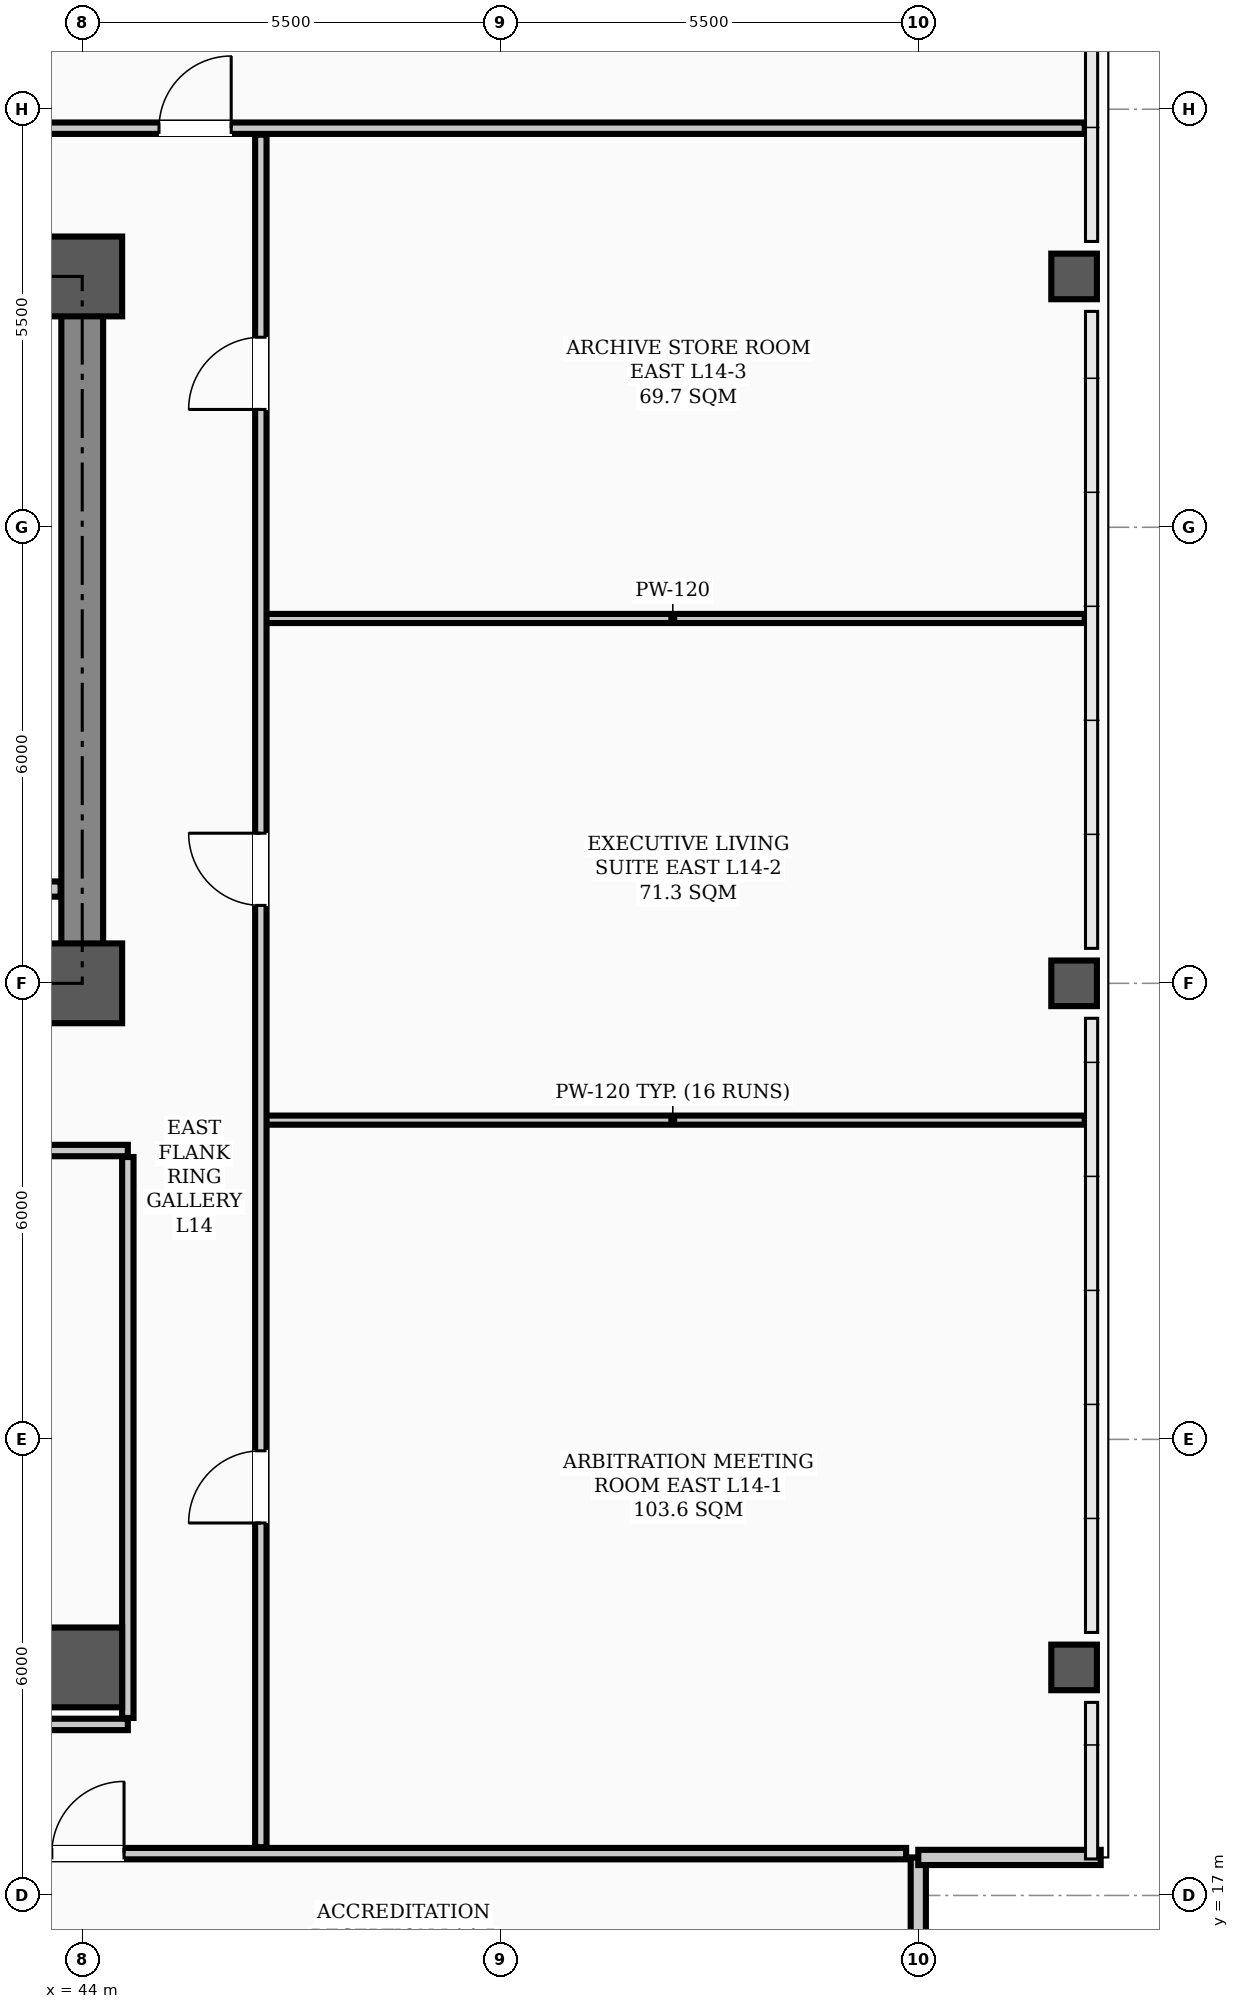
"""IFC4 building model, lengths in metres.
Left out: names, types, materials, properties, quantities, classifications, styles, units other than length and angle.
Written with IfcOpenShell. Run it as: python <this file> out.ifc"""

import sys

from ifc_helpers import new_model, si_unit, direction, frame, frame_2d, origin, origin_2d, place, context, subcontext, project, spatial, rectangle, hollow_rectangle, extrude, element, fill, save


model = new_model("IFC4")
c1 = context("Model", 3, precision=1e-05, world=origin(), true_north=direction((0.0, 1.0)))
c2 = subcontext(c1, "Body", "Model", "MODEL_VIEW")
j1 = project(units=[si_unit("LENGTHUNIT", "METRE"), si_unit("PLANEANGLEUNIT", "RADIAN")], contexts=[c1])
p1 = place(None, origin())
s1 = spatial("IfcSite", under=j1, at=p1, CompositionType="ELEMENT")
p2 = place(p1, origin())
s2 = spatial("IfcBuilding", under=s1, at=p2, CompositionType="ELEMENT")
p3 = place(p2, frame((0.0, 0.0, 57.7)))
s3 = spatial("IfcBuildingStorey", under=s2, at=p3, CompositionType="ELEMENT", Elevation=57.7)
for number, where, z_axis, x_axis in (
    (1, (44.0, 29.0, 0.0), (0.0, 0.0, 1.0), (1.0, 0.0, 0.0)),
    (2, (44.0, 38.3, 0.0), (0.0, 0.0, 1.0), (1.0, 0.0, 0.0)),
    (3, (44.0, 20.0, 0.0), (0.0, 0.0, 1.0), (1.0, 0.0, 0.0)),
):
    element("IfcColumn", number, at=place(p3, frame(where, z_axis=z_axis, x_axis=x_axis)), inside=s3, PredefinedType="COLUMN", context=c2, shape_type="SweptSolid", body=[
        extrude(hollow_rectangle(XDim=1.05, YDim=1.05, WallThickness=0.038, InnerFilletRadius=0.019, OuterFilletRadius=0.057, at=origin_2d()), origin(), (0.0, 0.0, 1.0), 3.9),
    ])
for number, where, z_axis, x_axis in (
    (4, (57.05, 20.0, 0.0), (0.0, 0.0, 1.0), (1.0, 0.0, 0.0)),
    (5, (57.05, 29.0, 0.0), (0.0, 0.0, 1.0), (1.0, 0.0, 0.0)),
    (6, (57.05, 38.3, 0.0), (0.0, 0.0, 1.0), (1.0, 0.0, 0.0)),
):
    element("IfcColumn", number, at=place(p3, frame(where, z_axis=z_axis, x_axis=x_axis)), inside=s3, PredefinedType="COLUMN", context=c2, shape_type="SweptSolid", body=[
        extrude(hollow_rectangle(XDim=0.6, YDim=0.6, WallThickness=0.026, InnerFilletRadius=0.013, OuterFilletRadius=0.039, at=origin_2d()), origin(), (0.0, 0.0, 1.0), 3.9),
    ])
for number, where, z_axis, x_axis in (
    (7, (55.0, 15.1, 0.0), (0.0, 0.0, 1.0), (0.0, 1.0, 0.0)),
    (8, (55.0, 17.5, 0.0), (0.0, 0.0, 1.0), (1.0, 0.0, 0.0)),
):
    element("IfcWall", number, at=place(p3, frame(where, z_axis=z_axis, x_axis=x_axis)), inside=s3, PredefinedType="PARAPET", context=c2, shape_type="SweptSolid", body=[
        extrude(rectangle(XDim=2.4, YDim=0.2, at=frame_2d((1.2, 0.0))), origin(), (0.0, 0.0, 1.0), 1.2),
    ])
p4 = place(p3, frame((13.5, 29.0, 0.0), z_axis=(0.0, 0.0, 1.0), x_axis=(1.0, 0.0, 0.0)))
e9 = element("IfcWall", 9, at=p4, inside=s3, PredefinedType="SHEAR", context=c2, shape_type="SweptSolid", body=[
    extrude(rectangle(XDim=30.5, YDim=0.55, at=frame_2d((15.25, 0.0))), origin(), (0.0, 0.0, 1.0), 3.72),
])
p5 = place(p4, frame((1.75, 0.0, 0.0)))
e10 = element("IfcOpeningElement", 10, at=p5, cuts=e9, PredefinedType="OPENING", context=c2, shape_type="SweptSolid", body=[
    extrude(rectangle(XDim=1.1, YDim=2.08, at=frame_2d((0.55, 1.04))), frame((0.0, 0.285, 0.0), z_axis=(0.0, -1.0, 0.0), x_axis=(1.0, 0.0, 0.0)), (0.0, 0.0, 1.0), 0.57),
])
p6 = place(p4, frame((26.7, 0.0, 0.0)))
e11 = element("IfcOpeningElement", 11, at=p6, cuts=e9, PredefinedType="OPENING", context=c2, shape_type="SweptSolid", body=[
    extrude(rectangle(XDim=1.1, YDim=2.08, at=frame_2d((0.55, 1.04))), frame((0.0, 0.285, 0.0), z_axis=(0.0, -1.0, 0.0), x_axis=(1.0, 0.0, 0.0)), (0.0, 0.0, 1.0), 0.57),
])
p7 = place(p4, frame((6.8, 0.0, 0.0)))
e12 = element("IfcOpeningElement", 12, at=p7, cuts=e9, PredefinedType="OPENING", context=c2, shape_type="SweptSolid", body=[
    extrude(rectangle(XDim=1.1, YDim=2.08, at=frame_2d((0.55, 1.04))), frame((0.0, 0.285, 0.0), z_axis=(0.0, -1.0, 0.0), x_axis=(1.0, 0.0, 0.0)), (0.0, 0.0, 1.0), 0.57),
])
p8 = place(p4, frame((13.2, 0.0, 0.0)))
e13 = element("IfcOpeningElement", 13, at=p8, cuts=e9, PredefinedType="OPENING", context=c2, shape_type="SweptSolid", body=[
    extrude(rectangle(XDim=1.6, YDim=2.08, at=frame_2d((0.8, 1.04))), frame((0.0, 0.285, 0.0), z_axis=(0.0, -1.0, 0.0), x_axis=(1.0, 0.0, 0.0)), (0.0, 0.0, 1.0), 0.57),
])
p9 = place(p4, frame((20.525, 0.0, 0.0)))
e14 = element("IfcOpeningElement", 14, at=p9, cuts=e9, PredefinedType="OPENING", context=c2, shape_type="SweptSolid", body=[
    extrude(rectangle(XDim=0.95, YDim=2.08, at=frame_2d((0.475, 1.04))), frame((0.0, 0.285, 0.0), z_axis=(0.0, -1.0, 0.0), x_axis=(1.0, 0.0, 0.0)), (0.0, 0.0, 1.0), 0.57),
])
p10 = place(p3, frame((13.5, 38.3, 0.0), z_axis=(0.0, 0.0, 1.0), x_axis=(1.0, 0.0, 0.0)))
e15 = element("IfcWall", 15, at=p10, inside=s3, PredefinedType="SHEAR", context=c2, shape_type="SweptSolid", body=[
    extrude(rectangle(XDim=30.5, YDim=0.55, at=frame_2d((15.25, 0.0))), origin(), (0.0, 0.0, 1.0), 3.72),
])
p11 = place(p3, frame((44.0, 29.35, 0.0), z_axis=(0.0, 0.0, 1.0), x_axis=(0.0, 1.0, 0.0)))
e16 = element("IfcWall", 16, at=p11, inside=s3, PredefinedType="SHEAR", context=c2, shape_type="SweptSolid", body=[
    extrude(rectangle(XDim=8.6, YDim=0.55, at=frame_2d((4.3, 0.0))), origin(), (0.0, 0.0, 1.0), 3.72),
])
p12 = place(p3, frame((42.4, 30.24, 0.0), z_axis=(0.0, 0.0, 1.0), x_axis=(1.0, 0.0, 0.0)))
e17 = element("IfcWall", 17, at=p12, inside=s3, PredefinedType="STANDARD", context=c2, shape_type="SweptSolid", body=[
    extrude(rectangle(XDim=1.315, YDim=0.2, at=frame_2d((0.658, 0.0))), origin(), (0.0, 0.0, 1.0), 3.1),
])
p13 = place(p3, frame((12.9, 26.8, 0.0), z_axis=(0.0, 0.0, 1.0), x_axis=(1.0, 0.0, 0.0)))
e18 = element("IfcWall", 18, at=p13, inside=s3, PredefinedType="PARTITIONING", context=c2, shape_type="SweptSolid", body=[
    extrude(rectangle(XDim=31.7, YDim=0.15, at=frame_2d((15.85, 0.0))), origin(), (0.0, 0.0, 1.0), 3.1),
])
p14 = place(p13, frame((13.6, 0.0, 0.0)))
e19 = element("IfcOpeningElement", 19, at=p14, cuts=e18, PredefinedType="OPENING", context=c2, shape_type="SweptSolid", body=[
    extrude(rectangle(XDim=1.6, YDim=2.08, at=frame_2d((0.8, 1.04))), frame((0.0, 0.085, 0.0), z_axis=(0.0, -1.0, 0.0), x_axis=(1.0, 0.0, 0.0)), (0.0, 0.0, 1.0), 0.17),
])
p15 = place(p13, frame((2.475, 0.0, 0.0)))
e20 = element("IfcOpeningElement", 20, at=p15, cuts=e18, PredefinedType="OPENING", context=c2, shape_type="SweptSolid", body=[
    extrude(rectangle(XDim=0.95, YDim=2.08, at=frame_2d((0.475, 1.04))), frame((0.0, 0.085, 0.0), z_axis=(0.0, -1.0, 0.0), x_axis=(1.0, 0.0, 0.0)), (0.0, 0.0, 1.0), 0.17),
])
p16 = place(p13, frame((5.725, 0.0, 0.0)))
e21 = element("IfcOpeningElement", 21, at=p16, cuts=e18, PredefinedType="OPENING", context=c2, shape_type="SweptSolid", body=[
    extrude(rectangle(XDim=0.95, YDim=2.08, at=frame_2d((0.475, 1.04))), frame((0.0, 0.085, 0.0), z_axis=(0.0, -1.0, 0.0), x_axis=(1.0, 0.0, 0.0)), (0.0, 0.0, 1.0), 0.17),
])
p17 = place(p13, frame((8.875, 0.0, 0.0)))
e22 = element("IfcOpeningElement", 22, at=p17, cuts=e18, PredefinedType="OPENING", context=c2, shape_type="SweptSolid", body=[
    extrude(rectangle(XDim=0.95, YDim=2.08, at=frame_2d((0.475, 1.04))), frame((0.0, 0.085, 0.0), z_axis=(0.0, -1.0, 0.0), x_axis=(1.0, 0.0, 0.0)), (0.0, 0.0, 1.0), 0.17),
])
p18 = place(p13, frame((16.075, 0.0, 0.0)))
e23 = element("IfcOpeningElement", 23, at=p18, cuts=e18, PredefinedType="OPENING", context=c2, shape_type="SweptSolid", body=[
    extrude(rectangle(XDim=0.95, YDim=2.08, at=frame_2d((0.475, 1.04))), frame((0.0, 0.085, 0.0), z_axis=(0.0, -1.0, 0.0), x_axis=(1.0, 0.0, 0.0)), (0.0, 0.0, 1.0), 0.17),
])
p19 = place(p13, frame((22.525, 0.0, 0.0)))
e24 = element("IfcOpeningElement", 24, at=p19, cuts=e18, PredefinedType="OPENING", context=c2, shape_type="SweptSolid", body=[
    extrude(rectangle(XDim=0.95, YDim=2.08, at=frame_2d((0.475, 1.04))), frame((0.0, 0.085, 0.0), z_axis=(0.0, -1.0, 0.0), x_axis=(1.0, 0.0, 0.0)), (0.0, 0.0, 1.0), 0.17),
])
p20 = place(p13, frame((28.825, 0.0, 0.0)))
e25 = element("IfcOpeningElement", 25, at=p20, cuts=e18, PredefinedType="OPENING", context=c2, shape_type="SweptSolid", body=[
    extrude(rectangle(XDim=0.95, YDim=2.08, at=frame_2d((0.475, 1.04))), frame((0.0, 0.085, 0.0), z_axis=(0.0, -1.0, 0.0), x_axis=(1.0, 0.0, 0.0)), (0.0, 0.0, 1.0), 0.17),
])
p21 = place(p3, frame((10.16, 17.55, 0.0), z_axis=(0.0, 0.0, 1.0), x_axis=(1.0, 0.0, 0.0)))
e26 = element("IfcWall", 26, at=p21, inside=s3, PredefinedType="PARTITIONING", context=c2, shape_type="SweptSolid", body=[
    extrude(rectangle(XDim=44.68, YDim=0.15, at=frame_2d((22.34, 0.0))), origin(), (0.0, 0.0, 1.0), 3.1),
])
p22 = place(p21, frame((2.64, 0.0, 0.0)))
e27 = element("IfcOpeningElement", 27, at=p22, cuts=e26, PredefinedType="OPENING", context=c2, shape_type="SweptSolid", body=[
    extrude(rectangle(XDim=0.95, YDim=2.08, at=frame_2d((0.475, 1.04))), frame((0.0, 0.085, 0.0), z_axis=(0.0, -1.0, 0.0), x_axis=(1.0, 0.0, 0.0)), (0.0, 0.0, 1.0), 0.17),
])
p23 = place(p21, frame((8.965, 0.0, 0.0)))
e28 = element("IfcOpeningElement", 28, at=p23, cuts=e26, PredefinedType="OPENING", context=c2, shape_type="SweptSolid", body=[
    extrude(rectangle(XDim=0.95, YDim=2.08, at=frame_2d((0.475, 1.04))), frame((0.0, 0.085, 0.0), z_axis=(0.0, -1.0, 0.0), x_axis=(1.0, 0.0, 0.0)), (0.0, 0.0, 1.0), 0.17),
])
p24 = place(p21, frame((23.815, 0.0, 0.0)))
e29 = element("IfcOpeningElement", 29, at=p24, cuts=e26, PredefinedType="OPENING", context=c2, shape_type="SweptSolid", body=[
    extrude(rectangle(XDim=0.95, YDim=2.08, at=frame_2d((0.475, 1.04))), frame((0.0, 0.085, 0.0), z_axis=(0.0, -1.0, 0.0), x_axis=(1.0, 0.0, 0.0)), (0.0, 0.0, 1.0), 0.17),
])
p25 = place(p21, frame((33.44, 0.0, 0.0)))
e30 = element("IfcOpeningElement", 30, at=p25, cuts=e26, PredefinedType="OPENING", context=c2, shape_type="SweptSolid", body=[
    extrude(rectangle(XDim=0.95, YDim=2.08, at=frame_2d((0.475, 1.04))), frame((0.0, 0.085, 0.0), z_axis=(0.0, -1.0, 0.0), x_axis=(1.0, 0.0, 0.0)), (0.0, 0.0, 1.0), 0.17),
])
p26 = place(p3, frame((28.4, 19.25, 0.0), z_axis=(0.0, 0.0, 1.0), x_axis=(1.0, 0.0, 0.0)))
e31 = element("IfcWall", 31, at=p26, inside=s3, PredefinedType="PARTITIONING", context=c2, shape_type="SweptSolid", body=[
    extrude(rectangle(XDim=16.2, YDim=0.15, at=frame_2d((8.1, 0.0))), origin(), (0.0, 0.0, 1.0), 3.1),
])
for number, where, z_axis, x_axis in (
    (32, (46.35, 27.2, 0.0), (0.0, 0.0, 1.0), (1.0, 0.0, 0.0)),
    (33, (46.35, 33.8, 0.0), (0.0, 0.0, 1.0), (1.0, 0.0, 0.0)),
):
    element("IfcWall", number, at=place(p3, frame(where, z_axis=z_axis, x_axis=x_axis)), inside=s3, PredefinedType="PARTITIONING", context=c2, shape_type="SweptSolid", body=[
        extrude(rectangle(XDim=10.84, YDim=0.12, at=frame_2d((5.42, 0.0))), origin(), (0.0, 0.0, 1.0), 3.212),
    ])
p27 = place(p3, frame((7.81, 40.25, 0.0), z_axis=(0.0, 0.0, 1.0), x_axis=(1.0, 0.0, 0.0)))
e34 = element("IfcWall", 34, at=p27, inside=s3, PredefinedType="PARTITIONING", context=c2, shape_type="SweptSolid", body=[
    extrude(rectangle(XDim=49.38, YDim=0.15, at=frame_2d((24.69, 0.0))), origin(), (0.0, 0.0, 1.0), 3.1),
])
p28 = place(p27, frame((3.73, 0.0, 0.0)))
e35 = element("IfcOpeningElement", 35, at=p28, cuts=e34, PredefinedType="OPENING", context=c2, shape_type="SweptSolid", body=[
    extrude(rectangle(XDim=0.95, YDim=2.08, at=frame_2d((0.475, 1.04))), frame((0.0, 0.085, 0.0), z_axis=(0.0, -1.0, 0.0), x_axis=(1.0, 0.0, 0.0)), (0.0, 0.0, 1.0), 0.17),
])
p29 = place(p27, frame((13.815, 0.0, 0.0)))
e36 = element("IfcOpeningElement", 36, at=p29, cuts=e34, PredefinedType="OPENING", context=c2, shape_type="SweptSolid", body=[
    extrude(rectangle(XDim=0.95, YDim=2.08, at=frame_2d((0.475, 1.04))), frame((0.0, 0.085, 0.0), z_axis=(0.0, -1.0, 0.0), x_axis=(1.0, 0.0, 0.0)), (0.0, 0.0, 1.0), 0.17),
])
p30 = place(p27, frame((19.965, 0.0, 0.0)))
e37 = element("IfcOpeningElement", 37, at=p30, cuts=e34, PredefinedType="OPENING", context=c2, shape_type="SweptSolid", body=[
    extrude(rectangle(XDim=0.95, YDim=2.08, at=frame_2d((0.475, 1.04))), frame((0.0, 0.085, 0.0), z_axis=(0.0, -1.0, 0.0), x_axis=(1.0, 0.0, 0.0)), (0.0, 0.0, 1.0), 0.17),
])
p31 = place(p27, frame((30.815, 0.0, 0.0)))
e38 = element("IfcOpeningElement", 38, at=p31, cuts=e34, PredefinedType="OPENING", context=c2, shape_type="SweptSolid", body=[
    extrude(rectangle(XDim=0.95, YDim=2.08, at=frame_2d((0.475, 1.04))), frame((0.0, 0.085, 0.0), z_axis=(0.0, -1.0, 0.0), x_axis=(1.0, 0.0, 0.0)), (0.0, 0.0, 1.0), 0.17),
])
p32 = place(p27, frame((37.2, 0.0, 0.0)))
e39 = element("IfcOpeningElement", 39, at=p32, cuts=e34, PredefinedType="OPENING", context=c2, shape_type="SweptSolid", body=[
    extrude(rectangle(XDim=0.95, YDim=2.08, at=frame_2d((0.475, 1.04))), frame((0.0, 0.085, 0.0), z_axis=(0.0, -1.0, 0.0), x_axis=(1.0, 0.0, 0.0)), (0.0, 0.0, 1.0), 0.17),
])
p33 = place(p3, frame((46.35, 17.635, 0.0), z_axis=(0.0, 0.0, 1.0), x_axis=(0.0, 1.0, 0.0)))
e40 = element("IfcWall", 40, at=p33, inside=s3, PredefinedType="PARTITIONING", context=c2, shape_type="SweptSolid", body=[
    extrude(rectangle(XDim=22.53, YDim=0.15, at=frame_2d((11.265, 0.0))), origin(), (0.0, 0.0, 1.0), 3.0),
])
p34 = place(p33, frame((4.265, 0.0, 0.0)))
e41 = element("IfcOpeningElement", 41, at=p34, cuts=e40, PredefinedType="OPENING", context=c2, shape_type="SweptSolid", body=[
    extrude(rectangle(XDim=0.95, YDim=2.08, at=frame_2d((0.475, 1.04))), frame((0.0, 0.085, 0.0), z_axis=(0.0, -1.0, 0.0), x_axis=(1.0, 0.0, 0.0)), (0.0, 0.0, 1.0), 0.17),
])
p35 = place(p33, frame((12.39, 0.0, 0.0)))
e42 = element("IfcOpeningElement", 42, at=p35, cuts=e40, PredefinedType="OPENING", context=c2, shape_type="SweptSolid", body=[
    extrude(rectangle(XDim=0.95, YDim=2.08, at=frame_2d((0.475, 1.04))), frame((0.0, 0.085, 0.0), z_axis=(0.0, -1.0, 0.0), x_axis=(1.0, 0.0, 0.0)), (0.0, 0.0, 1.0), 0.17),
])
p36 = place(p33, frame((18.915, 0.0, 0.0)))
e43 = element("IfcOpeningElement", 43, at=p36, cuts=e40, PredefinedType="OPENING", context=c2, shape_type="SweptSolid", body=[
    extrude(rectangle(XDim=0.95, YDim=2.08, at=frame_2d((0.475, 1.04))), frame((0.0, 0.085, 0.0), z_axis=(0.0, -1.0, 0.0), x_axis=(1.0, 0.0, 0.0)), (0.0, 0.0, 1.0), 0.17),
])
p37 = place(p3, frame((44.6, 19.335, 0.0), z_axis=(0.0, 0.0, 1.0), x_axis=(0.0, 1.0, 0.0)))
e44 = element("IfcWall", 44, at=p37, inside=s3, PredefinedType="PARTITIONING", context=c2, shape_type="SweptSolid", body=[
    extrude(rectangle(XDim=7.38, YDim=0.15, at=frame_2d((3.69, 0.0))), origin(), (0.0, 0.0, 1.0), 3.0),
])
p38 = place(p25, origin())
e45 = element("IfcDoor", 45, at=p38, inside=s3, OperationType="SINGLE_SWING_RIGHT", PredefinedType="DOOR", context=c2, shape_type="SweptSolid", body=[
    extrude(rectangle(XDim=0.95, YDim=2.08, at=frame_2d((0.475, 1.04))), frame((0.0, 0.025, 0.0), z_axis=(0.0, -1.0, 0.0), x_axis=(1.0, 0.0, 0.0)), (0.0, 0.0, 1.0), 0.05),
])
fill(e30, e45)
p39 = place(p34, origin())
e46 = element("IfcDoor", 46, at=p39, inside=s3, OperationType="SINGLE_SWING_LEFT", PredefinedType="DOOR", context=c2, shape_type="SweptSolid", body=[
    extrude(rectangle(XDim=0.95, YDim=2.08, at=frame_2d((0.475, 1.04))), frame((0.0, 0.025, 0.0), z_axis=(0.0, -1.0, 0.0), x_axis=(1.0, 0.0, 0.0)), (0.0, 0.0, 1.0), 0.05),
])
fill(e41, e46)
p40 = place(p35, origin())
e47 = element("IfcDoor", 47, at=p40, inside=s3, OperationType="SINGLE_SWING_RIGHT", PredefinedType="DOOR", context=c2, shape_type="SweptSolid", body=[
    extrude(rectangle(XDim=0.95, YDim=2.08, at=frame_2d((0.475, 1.04))), frame((0.0, 0.025, 0.0), z_axis=(0.0, -1.0, 0.0), x_axis=(1.0, 0.0, 0.0)), (0.0, 0.0, 1.0), 0.05),
])
fill(e42, e47)
p41 = place(p36, origin())
e48 = element("IfcDoor", 48, at=p41, inside=s3, OperationType="SINGLE_SWING_LEFT", PredefinedType="DOOR", context=c2, shape_type="SweptSolid", body=[
    extrude(rectangle(XDim=0.95, YDim=2.08, at=frame_2d((0.475, 1.04))), frame((0.0, 0.025, 0.0), z_axis=(0.0, -1.0, 0.0), x_axis=(1.0, 0.0, 0.0)), (0.0, 0.0, 1.0), 0.05),
])
fill(e43, e48)
p42 = place(p32, origin())
e49 = element("IfcDoor", 49, at=p42, inside=s3, OperationType="SINGLE_SWING_RIGHT", PredefinedType="DOOR", context=c2, shape_type="SweptSolid", body=[
    extrude(rectangle(XDim=0.95, YDim=2.08, at=frame_2d((0.475, 1.04))), frame((0.0, 0.025, 0.0), z_axis=(0.0, -1.0, 0.0), x_axis=(1.0, 0.0, 0.0)), (0.0, 0.0, 1.0), 0.05),
])
fill(e39, e49)
save(model, sys.argv[1])
